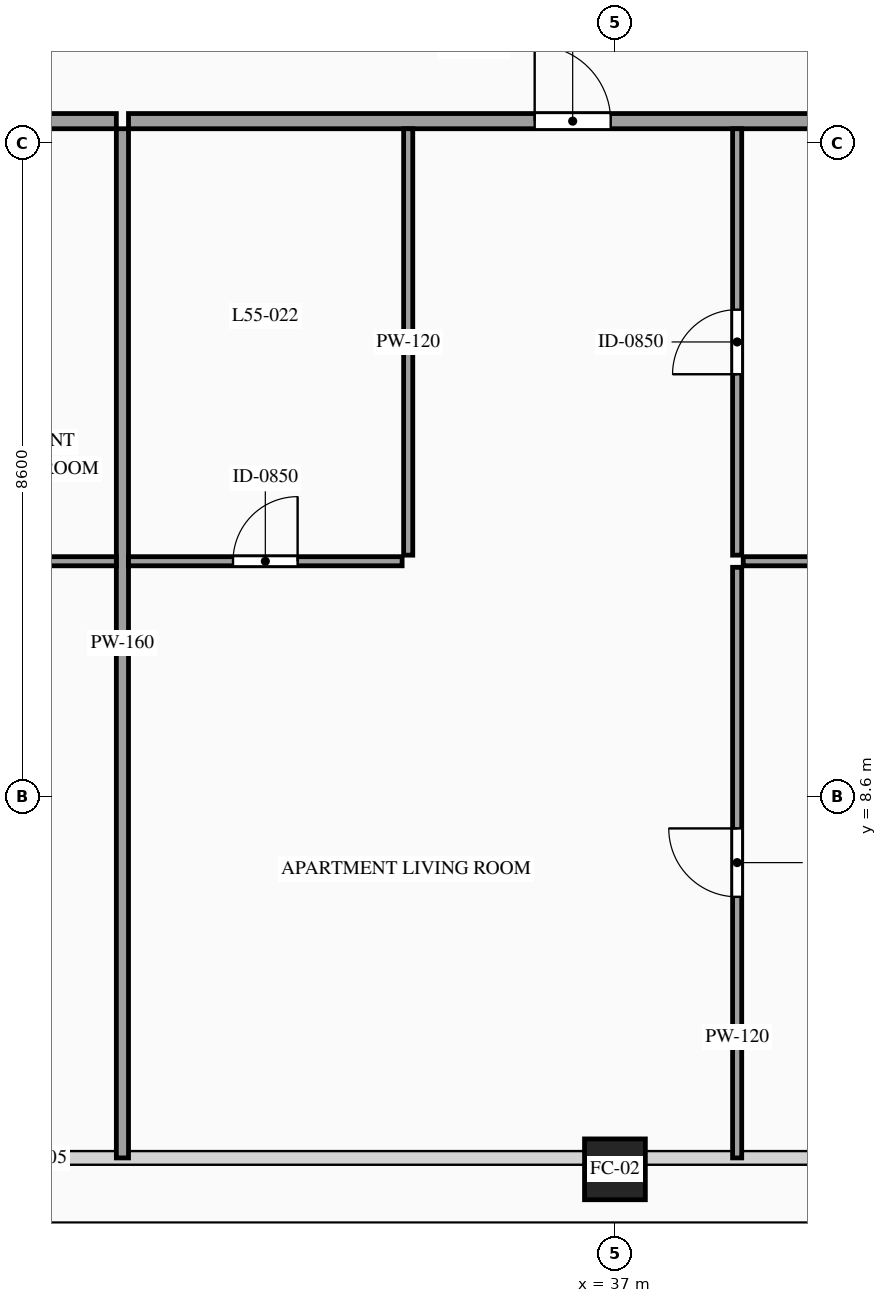
"""IFC4 building model, lengths in metres.
Left out: names, types, materials, properties, quantities, classifications, styles, units other than length and angle.
Written with IfcOpenShell. Run it as: python <this file> out.ifc"""

import sys

from ifc_helpers import new_model, si_unit, direction, frame, frame_2d, origin, origin_2d, place, context, subcontext, project, spatial, rectangle, hollow_rectangle, extrude, source, transform, mapped, element, fill, save


model = new_model("IFC4")
c1 = context("Model", 3, precision=1e-05, world=origin(), true_north=direction((0.0, 1.0)))
c2 = subcontext(c1, "Body", "Model", "MODEL_VIEW")
j1 = project(units=[si_unit("LENGTHUNIT", "METRE"), si_unit("PLANEANGLEUNIT", "RADIAN")], contexts=[c1])
p1 = place(None, origin())
s1 = spatial("IfcSite", under=j1, at=p1, CompositionType="ELEMENT")
p2 = place(p1, origin())
s2 = spatial("IfcBuilding", under=s1, at=p2, CompositionType="ELEMENT")
p3 = place(p2, frame((0.0, 0.0, 209.0)))
s3 = spatial("IfcBuildingStorey", under=s2, at=p3, CompositionType="ELEMENT", Elevation=209.0)
m1 = source(origin(), c2, "Body", "SweptSolid", [
    extrude(hollow_rectangle(XDim=0.8, YDim=0.8, WallThickness=0.036, at=origin_2d()), origin(), (0.0, 0.0, 1.0), 3.5),
])
p4 = place(p3, frame((37.0, 3.7, 0.0), z_axis=(0.0, 0.0, 1.0), x_axis=(1.0, 0.0, 0.0)))
e1 = element("IfcColumn", 1, at=p4, inside=s3, PredefinedType="COLUMN", context=c2, shape_type="MappedRepresentation", body=[
    mapped(m1, transform((0.0, 0.0, 0.0), scale=1.0)),
])
p5 = place(p3, frame((17.94, 17.49, 0.0), z_axis=(0.0, 0.0, 1.0), x_axis=(1.0, 0.0, 0.0)))
e2 = element("IfcWall", 2, at=p5, inside=s3, PredefinedType="PARTITIONING", context=c2, shape_type="SweptSolid", body=[
    extrude(rectangle(XDim=12.5, YDim=0.2, at=frame_2d((6.25, 0.0))), origin(), (0.0, 0.0, 1.0), 3.28),
])
p6 = place(p5, frame((5.194, 0.0, 0.0)))
e3 = element("IfcOpeningElement", 3, at=p6, cuts=e2, PredefinedType="OPENING", context=c2, shape_type="SweptSolid", body=[
    extrude(rectangle(XDim=1.0, YDim=2.2, at=frame_2d((0.5, 1.1))), frame((0.0, 0.115, 0.0), z_axis=(0.0, -1.0, 0.0), x_axis=(1.0, 0.0, 0.0)), (0.0, 0.0, 1.0), 0.23),
])
m2 = source(origin(), c2, "Body", "SweptSolid", [
    extrude(rectangle(XDim=13.54, YDim=0.16, at=frame_2d((6.77, 0.0))), origin(), (0.0, 0.0, 1.0), 3.28),
])
p7 = place(p3, frame((30.52, 3.85, 0.0), z_axis=(0.0, 0.0, 1.0), x_axis=(0.0, 1.0, 0.0)))
e4 = element("IfcWall", 4, at=p7, inside=s3, PredefinedType="PARTITIONING", context=c2, shape_type="MappedRepresentation", body=[
    mapped(m2, transform((0.0, 0.0, 0.0), scale=1.0)),
])
m3 = source(origin(), c2, "Body", "SweptSolid", [
    extrude(rectangle(XDim=4.712, YDim=0.12, at=frame_2d((2.356, 0.0))), origin(), (0.0, 0.0, 1.0), 2.875),
])
p8 = place(p3, frame((25.728, 11.7, 0.0), z_axis=(0.0, 0.0, 1.0), x_axis=(1.0, 0.0, 0.0)))
e5 = element("IfcWall", 5, at=p8, inside=s3, PredefinedType="PARTITIONING", context=c2, shape_type="MappedRepresentation", body=[
    mapped(m3, transform((0.0, 0.0, 0.0), scale=1.0)),
])
p9 = place(p3, frame((30.6, 17.49, 0.0), z_axis=(0.0, 0.0, 1.0), x_axis=(1.0, 0.0, 0.0)))
e6 = element("IfcWall", 6, at=p9, inside=s3, PredefinedType="PARTITIONING", context=c2, shape_type="SweptSolid", body=[
    extrude(rectangle(XDim=12.8, YDim=0.2, at=frame_2d((6.4, 0.0))), origin(), (0.0, 0.0, 1.0), 3.28),
])
p10 = place(p9, frame((5.344, 0.0, 0.0)))
e7 = element("IfcOpeningElement", 7, at=p10, cuts=e6, PredefinedType="OPENING", context=c2, shape_type="SweptSolid", body=[
    extrude(rectangle(XDim=1.0, YDim=2.2, at=frame_2d((0.5, 1.1))), frame((0.0, 0.115, 0.0), z_axis=(0.0, -1.0, 0.0), x_axis=(1.0, 0.0, 0.0)), (0.0, 0.0, 1.0), 0.23),
])
p11 = place(p3, frame((30.6, 11.7, 0.0), z_axis=(0.0, 0.0, 1.0), x_axis=(1.0, 0.0, 0.0)))
e8 = element("IfcWall", 8, at=p11, inside=s3, PredefinedType="PARTITIONING", context=c2, shape_type="SweptSolid", body=[
    extrude(rectangle(XDim=3.6, YDim=0.12, at=frame_2d((1.8, 0.0))), origin(), (0.0, 0.0, 1.0), 2.875),
])
p12 = place(p11, frame((1.375, 0.0, 0.0)))
e9 = element("IfcOpeningElement", 9, at=p12, cuts=e8, PredefinedType="OPENING", context=c2, shape_type="SweptSolid", body=[
    extrude(rectangle(XDim=0.85, YDim=2.1, at=frame_2d((0.425, 1.05))), frame((0.0, 0.075, 0.0), z_axis=(0.0, -1.0, 0.0), x_axis=(1.0, 0.0, 0.0)), (0.0, 0.0, 1.0), 0.15),
])
m4 = source(origin(), c2, "Body", "SweptSolid", [
    extrude(rectangle(XDim=5.61, YDim=0.12, at=frame_2d((2.805, 0.0))), origin(), (0.0, 0.0, 1.0), 3.28),
])
p13 = place(p3, frame((34.28, 11.78, 0.0), z_axis=(0.0, 0.0, 1.0), x_axis=(0.0, 1.0, 0.0)))
e10 = element("IfcWall", 10, at=p13, inside=s3, PredefinedType="PARTITIONING", context=c2, shape_type="MappedRepresentation", body=[
    mapped(m4, transform((0.0, 0.0, 0.0), scale=1.0)),
])
p14 = place(p3, frame((38.688, 11.7, 0.0), z_axis=(0.0, 0.0, 1.0), x_axis=(1.0, 0.0, 0.0)))
e11 = element("IfcWall", 11, at=p14, inside=s3, PredefinedType="PARTITIONING", context=c2, shape_type="MappedRepresentation", body=[
    mapped(m3, transform((0.0, 0.0, 0.0), scale=1.0)),
])
p15 = place(p3, frame((38.608, 3.85, 0.0), z_axis=(0.0, 0.0, 1.0), x_axis=(0.0, 1.0, 0.0)))
e12 = element("IfcWall", 12, at=p15, inside=s3, PredefinedType="PARTITIONING", context=c2, shape_type="SweptSolid", body=[
    extrude(rectangle(XDim=7.77, YDim=0.12, at=frame_2d((3.885, 0.0))), origin(), (0.0, 0.0, 1.0), 3.28),
])
p16 = place(p15, frame((3.435, 0.0, 0.0)))
e13 = element("IfcOpeningElement", 13, at=p16, cuts=e12, PredefinedType="OPENING", context=c2, shape_type="SweptSolid", body=[
    extrude(rectangle(XDim=0.9, YDim=2.15, at=frame_2d((0.45, 1.075))), frame((0.0, 0.075, 0.0), z_axis=(0.0, -1.0, 0.0), x_axis=(1.0, 0.0, 0.0)), (0.0, 0.0, 1.0), 0.15),
])
p17 = place(p3, frame((38.608, 11.78, 0.0), z_axis=(0.0, 0.0, 1.0), x_axis=(0.0, 1.0, 0.0)))
e14 = element("IfcWall", 14, at=p17, inside=s3, PredefinedType="PARTITIONING", context=c2, shape_type="SweptSolid", body=[
    extrude(rectangle(XDim=5.61, YDim=0.12, at=frame_2d((2.805, 0.0))), origin(), (0.0, 0.0, 1.0), 3.28),
])
p18 = place(p17, frame((2.38, 0.0, 0.0)))
e15 = element("IfcOpeningElement", 15, at=p18, cuts=e14, PredefinedType="OPENING", context=c2, shape_type="SweptSolid", body=[
    extrude(rectangle(XDim=0.85, YDim=2.1, at=frame_2d((0.425, 1.05))), frame((0.0, 0.075, 0.0), z_axis=(0.0, -1.0, 0.0), x_axis=(1.0, 0.0, 0.0)), (0.0, 0.0, 1.0), 0.15),
])
m5 = source(origin(), c2, "Body", "SweptSolid", [
    extrude(rectangle(XDim=1.0, YDim=2.2, at=frame_2d((0.5, 1.1))), frame((0.0, 0.025, 0.0), z_axis=(0.0, -1.0, 0.0), x_axis=(1.0, 0.0, 0.0)), (0.0, 0.0, 1.0), 0.05),
])
p19 = place(p10, origin())
e16 = element("IfcDoor", 16, at=p19, inside=s3, OperationType="SINGLE_SWING_LEFT", PredefinedType="DOOR", context=c2, shape_type="MappedRepresentation", body=[
    mapped(m5, transform((0.0, 0.0, 0.0), scale=1.0)),
])
fill(e7, e16)
m6 = source(origin(), c2, "Body", "SweptSolid", [
    extrude(rectangle(XDim=0.85, YDim=2.1, at=frame_2d((0.425, 1.05))), frame((0.0, 0.025, 0.0), z_axis=(0.0, -1.0, 0.0), x_axis=(1.0, 0.0, 0.0)), (0.0, 0.0, 1.0), 0.05),
])
p20 = place(p12, origin())
e17 = element("IfcDoor", 17, at=p20, inside=s3, OperationType="SINGLE_SWING_RIGHT", PredefinedType="DOOR", context=c2, shape_type="MappedRepresentation", body=[
    mapped(m6, transform((0.0, 0.0, 0.0), scale=1.0)),
])
fill(e9, e17)
m7 = source(origin(), c2, "Body", "SweptSolid", [
    extrude(rectangle(XDim=0.9, YDim=2.15, at=frame_2d((0.45, 1.075))), frame((0.0, 0.025, 0.0), z_axis=(0.0, -1.0, 0.0), x_axis=(1.0, 0.0, 0.0)), (0.0, 0.0, 1.0), 0.05),
])
p21 = place(p16, origin())
e18 = element("IfcDoor", 18, at=p21, inside=s3, OperationType="SINGLE_SWING_RIGHT", PredefinedType="DOOR", context=c2, shape_type="MappedRepresentation", body=[
    mapped(m7, transform((0.0, 0.0, 0.0), scale=1.0)),
])
fill(e13, e18)
p22 = place(p18, origin())
e19 = element("IfcDoor", 19, at=p22, inside=s3, OperationType="SINGLE_SWING_LEFT", PredefinedType="DOOR", context=c2, shape_type="MappedRepresentation", body=[
    mapped(m6, transform((0.0, 0.0, 0.0), scale=1.0)),
])
fill(e15, e19)
save(model, sys.argv[1])
